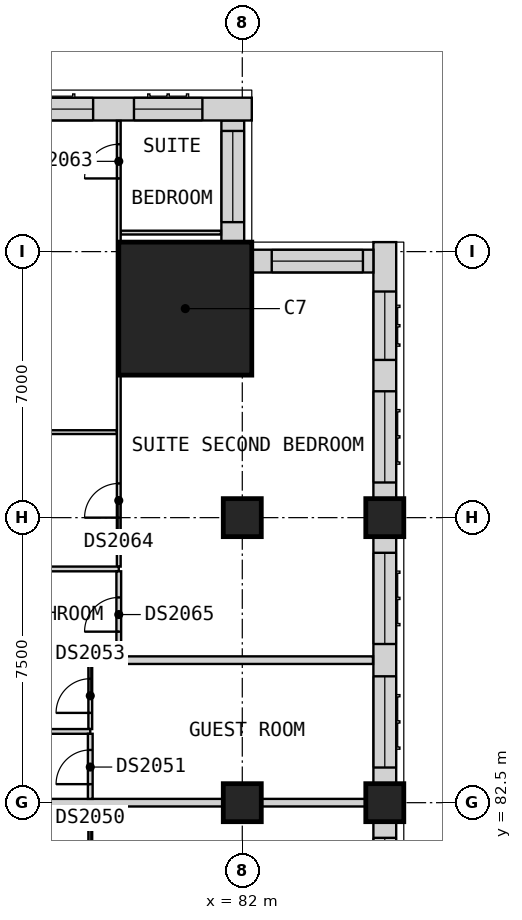
"""IFC4 building model, lengths in metres.
Left out: names, types, materials, properties, quantities, classifications, styles, units other than length and angle.
Written with IfcOpenShell. Run it as: python <this file> out.ifc"""

import sys

from ifc_helpers import new_model, si_unit, direction, frame, frame_2d, origin, origin_2d, place, context, subcontext, project, spatial, rectangle, extrude, element, fill, save


model = new_model("IFC4")
c1 = context("Model", 3, precision=1e-05, world=origin(), true_north=direction((0.0, 1.0)))
c2 = subcontext(c1, "Body", "Model", "MODEL_VIEW")
j1 = project(units=[si_unit("LENGTHUNIT", "METRE"), si_unit("PLANEANGLEUNIT", "RADIAN")], contexts=[c1])
p1 = place(None, origin())
s1 = spatial("IfcSite", under=j1, at=p1, CompositionType="ELEMENT")
p2 = place(p1, origin())
s2 = spatial("IfcBuilding", under=s1, at=p2, CompositionType="ELEMENT")
p3 = place(p2, frame((0.0, 0.0, 133.8)))
s3 = spatial("IfcBuildingStorey", under=s2, at=p3, CompositionType="ELEMENT", Elevation=133.8)
for number, where, z_axis, x_axis in (
    (1, (85.75, 82.5, 0.0), (0.0, 0.0, 1.0), (1.0, 0.0, 0.0)),
    (2, (85.75, 90.0, 0.0), (0.0, 0.0, 1.0), (1.0, 0.0, 0.0)),
    (3, (82.0, 82.5, 0.0), (0.0, 0.0, 1.0), (1.0, 0.0, 0.0)),
    (4, (82.0, 90.0, 0.0), (0.0, 0.0, 1.0), (1.0, 0.0, 0.0)),
):
    element("IfcColumn", number, at=place(p3, frame(where, z_axis=z_axis, x_axis=x_axis)), inside=s3, PredefinedType="COLUMN", context=c2, shape_type="SweptSolid", body=[
        extrude(rectangle(XDim=1.0, YDim=1.0, at=origin_2d()), origin(), (0.0, 0.0, 1.0), 3.6),
    ])
p4 = place(p3, frame((80.5, 95.5, 0.0), z_axis=(0.0, 0.0, 1.0), x_axis=(1.0, 0.0, 0.0)))
e5 = element("IfcColumn", 5, at=p4, inside=s3, PredefinedType="COLUMN", context=c2, shape_type="SweptSolid", body=[
    extrude(rectangle(XDim=3.5, YDim=3.5, at=origin_2d()), origin(), (0.0, 0.0, 1.0), 3.6),
])
p5 = place(p3, frame((85.75, 75.5, 0.0), z_axis=(0.0, 0.0, 1.0), x_axis=(0.0, 1.0, 0.0)))
e6 = element("IfcWall", 6, at=p5, inside=s3, PredefinedType="SOLIDWALL", context=c2, shape_type="SweptSolid", body=[
    extrude(rectangle(XDim=6.5, YDim=0.6, at=frame_2d((3.25, 0.0))), origin(), (0.0, 0.0, 1.0), 2.85),
])
p6 = place(p5, frame((0.425, 0.0, 0.8)))
e7 = element("IfcOpeningElement", 7, at=p6, cuts=e6, PredefinedType="OPENING", context=c2, shape_type="SweptSolid", body=[
    extrude(rectangle(XDim=2.4, YDim=1.8, at=frame_2d((1.2, 0.9))), frame((0.0, 0.31, 0.0), z_axis=(0.0, -1.0, 0.0), x_axis=(1.0, 0.0, 0.0)), (0.0, 0.0, 1.0), 0.62),
])
p7 = place(p5, frame((3.675, 0.0, 0.8)))
e8 = element("IfcOpeningElement", 8, at=p7, cuts=e6, PredefinedType="OPENING", context=c2, shape_type="SweptSolid", body=[
    extrude(rectangle(XDim=2.4, YDim=1.8, at=frame_2d((1.2, 0.9))), frame((0.0, 0.31, 0.0), z_axis=(0.0, -1.0, 0.0), x_axis=(1.0, 0.0, 0.0)), (0.0, 0.0, 1.0), 0.62),
])
p8 = place(p3, frame((85.75, 83.0, 0.0), z_axis=(0.0, 0.0, 1.0), x_axis=(0.0, 1.0, 0.0)))
e9 = element("IfcWall", 9, at=p8, inside=s3, PredefinedType="SOLIDWALL", context=c2, shape_type="SweptSolid", body=[
    extrude(rectangle(XDim=6.5, YDim=0.6, at=frame_2d((3.25, 0.0))), origin(), (0.0, 0.0, 1.0), 2.85),
])
p9 = place(p8, frame((0.425, 0.0, 0.8)))
e10 = element("IfcOpeningElement", 10, at=p9, cuts=e9, PredefinedType="OPENING", context=c2, shape_type="SweptSolid", body=[
    extrude(rectangle(XDim=2.4, YDim=1.8, at=frame_2d((1.2, 0.9))), frame((0.0, 0.31, 0.0), z_axis=(0.0, -1.0, 0.0), x_axis=(1.0, 0.0, 0.0)), (0.0, 0.0, 1.0), 0.62),
])
p10 = place(p8, frame((3.675, 0.0, 0.8)))
e11 = element("IfcOpeningElement", 11, at=p10, cuts=e9, PredefinedType="OPENING", context=c2, shape_type="SweptSolid", body=[
    extrude(rectangle(XDim=2.4, YDim=1.8, at=frame_2d((1.2, 0.9))), frame((0.0, 0.31, 0.0), z_axis=(0.0, -1.0, 0.0), x_axis=(1.0, 0.0, 0.0)), (0.0, 0.0, 1.0), 0.62),
])
p11 = place(p3, frame((85.75, 90.5, 0.0), z_axis=(0.0, 0.0, 1.0), x_axis=(0.0, 1.0, 0.0)))
e12 = element("IfcWall", 12, at=p11, inside=s3, PredefinedType="SOLIDWALL", context=c2, shape_type="SweptSolid", body=[
    extrude(rectangle(XDim=6.75, YDim=0.6, at=frame_2d((3.375, 0.0))), origin(), (0.0, 0.0, 1.0), 2.85),
])
p12 = place(p11, frame((0.425, 0.0, 0.8)))
e13 = element("IfcOpeningElement", 13, at=p12, cuts=e12, PredefinedType="OPENING", context=c2, shape_type="SweptSolid", body=[
    extrude(rectangle(XDim=2.4, YDim=1.8, at=frame_2d((1.2, 0.9))), frame((0.0, 0.31, 0.0), z_axis=(0.0, -1.0, 0.0), x_axis=(1.0, 0.0, 0.0)), (0.0, 0.0, 1.0), 0.62),
])
p13 = place(p11, frame((3.65, 0.0, 0.8)))
e14 = element("IfcOpeningElement", 14, at=p13, cuts=e12, PredefinedType="OPENING", context=c2, shape_type="SweptSolid", body=[
    extrude(rectangle(XDim=1.8, YDim=1.8, at=frame_2d((0.9, 0.9))), frame((0.0, 0.31, 0.0), z_axis=(0.0, -1.0, 0.0), x_axis=(1.0, 0.0, 0.0)), (0.0, 0.0, 1.0), 0.62),
])
p14 = place(p3, frame((85.45, 96.75, 0.0), z_axis=(0.0, 0.0, 1.0), x_axis=(-1.0, 0.0, 0.0)))
e15 = element("IfcWall", 15, at=p14, inside=s3, PredefinedType="SOLIDWALL", context=c2, shape_type="SweptSolid", body=[
    extrude(rectangle(XDim=3.2, YDim=0.6, at=frame_2d((1.6, 0.0))), origin(), (0.0, 0.0, 1.0), 3.35),
])
p15 = place(p14, frame((0.275, 0.0, 0.8)))
e16 = element("IfcOpeningElement", 16, at=p15, cuts=e15, PredefinedType="OPENING", context=c2, shape_type="SweptSolid", body=[
    extrude(rectangle(XDim=2.4, YDim=1.8, at=frame_2d((1.2, 0.9))), frame((0.0, 0.31, 0.0), z_axis=(0.0, -1.0, 0.0), x_axis=(1.0, 0.0, 0.0)), (0.0, 0.0, 1.0), 0.62),
])
p16 = place(p3, frame((81.75, 97.25, 0.0), z_axis=(0.0, 0.0, 1.0), x_axis=(0.0, 1.0, 0.0)))
e17 = element("IfcWall", 17, at=p16, inside=s3, PredefinedType="SOLIDWALL", context=c2, shape_type="SweptSolid", body=[
    extrude(rectangle(XDim=3.2, YDim=0.6, at=frame_2d((1.6, 0.0))), origin(), (0.0, 0.0, 1.0), 3.35),
])
p17 = place(p16, frame((0.525, 0.0, 0.8)))
e18 = element("IfcOpeningElement", 18, at=p17, cuts=e17, PredefinedType="OPENING", context=c2, shape_type="SweptSolid", body=[
    extrude(rectangle(XDim=2.4, YDim=1.8, at=frame_2d((1.2, 0.9))), frame((0.0, 0.31, 0.0), z_axis=(0.0, -1.0, 0.0), x_axis=(1.0, 0.0, 0.0)), (0.0, 0.0, 1.0), 0.62),
])
p18 = place(p3, frame((82.25, 100.75, 0.0), z_axis=(0.0, 0.0, 1.0), x_axis=(-1.0, 0.0, 0.0)))
e19 = element("IfcWall", 19, at=p18, inside=s3, PredefinedType="SOLIDWALL", context=c2, shape_type="SweptSolid", body=[
    extrude(rectangle(XDim=7.25, YDim=0.6, at=frame_2d((3.625, 0.0))), origin(), (0.0, 0.0, 1.0), 2.85),
])
p19 = place(p18, frame((4.175, 0.0, 0.8)))
e20 = element("IfcOpeningElement", 20, at=p19, cuts=e19, PredefinedType="OPENING", context=c2, shape_type="SweptSolid", body=[
    extrude(rectangle(XDim=2.4, YDim=1.8, at=frame_2d((1.2, 0.9))), frame((0.0, 0.31, 0.0), z_axis=(0.0, -1.0, 0.0), x_axis=(1.0, 0.0, 0.0)), (0.0, 0.0, 1.0), 0.62),
])
p20 = place(p18, frame((1.3, 0.0, 0.8)))
e21 = element("IfcOpeningElement", 21, at=p20, cuts=e19, PredefinedType="OPENING", context=c2, shape_type="SweptSolid", body=[
    extrude(rectangle(XDim=1.8, YDim=1.8, at=frame_2d((0.9, 0.9))), frame((0.0, 0.31, 0.0), z_axis=(0.0, -1.0, 0.0), x_axis=(1.0, 0.0, 0.0)), (0.0, 0.0, 1.0), 0.62),
])
p21 = place(p3, frame((73.725, 82.5, 0.0), z_axis=(0.0, 0.0, 1.0), x_axis=(1.0, 0.0, 0.0)))
e22 = element("IfcWall", 22, at=p21, inside=s3, PredefinedType="PARTITIONING", context=c2, shape_type="SweptSolid", body=[
    extrude(rectangle(XDim=12.525, YDim=0.2, at=frame_2d((6.262, 0.0))), origin(), (0.0, 0.0, 1.0), 3.35),
])
p22 = place(p3, frame((73.725, 86.25, 0.0), z_axis=(0.0, 0.0, 1.0), x_axis=(1.0, 0.0, 0.0)))
e23 = element("IfcWall", 23, at=p22, inside=s3, PredefinedType="PARTITIONING", context=c2, shape_type="SweptSolid", body=[
    extrude(rectangle(XDim=11.715, YDim=0.2, at=frame_2d((5.857, 0.0))), origin(), (0.0, 0.0, 1.0), 3.35),
])
p23 = place(p3, frame((71.35, 92.25, 0.0), z_axis=(0.0, 0.0, 1.0), x_axis=(1.0, 0.0, 0.0)))
e24 = element("IfcWall", 24, at=p23, inside=s3, PredefinedType="PARTITIONING", context=c2, shape_type="SweptSolid", body=[
    extrude(rectangle(XDim=7.35, YDim=0.1, at=frame_2d((3.675, 0.0))), origin(), (0.0, 0.0, 1.0), 3.35),
])
p24 = place(p23, frame((0.65, 0.0, 0.0)))
e25 = element("IfcOpeningElement", 25, at=p24, cuts=e24, PredefinedType="OPENING", context=c2, shape_type="SweptSolid", body=[
    extrude(rectangle(XDim=0.9, YDim=2.1, at=frame_2d((0.45, 1.05))), frame((0.0, 0.06, 0.0), z_axis=(0.0, -1.0, 0.0), x_axis=(1.0, 0.0, 0.0)), (0.0, 0.0, 1.0), 0.12),
])
p25 = place(p3, frame((78.8, 97.5, 0.0), z_axis=(0.0, 0.0, 1.0), x_axis=(1.0, 0.0, 0.0)))
e26 = element("IfcWall", 26, at=p25, inside=s3, PredefinedType="PARTITIONING", context=c2, shape_type="SweptSolid", body=[
    extrude(rectangle(XDim=2.64, YDim=0.1, at=frame_2d((1.32, 0.0))), origin(), (0.0, 0.0, 1.0), 3.35),
])
p26 = place(p3, frame((78.0, 79.562, 0.0), z_axis=(0.0, 0.0, 1.0), x_axis=(0.0, 1.0, 0.0)))
e27 = element("IfcWall", 27, at=p26, inside=s3, PredefinedType="PARTITIONING", context=c2, shape_type="SweptSolid", body=[
    extrude(rectangle(XDim=2.837, YDim=0.1, at=frame_2d((1.419, 0.0))), origin(), (0.0, 0.0, 1.0), 3.35),
])
p27 = place(p26, frame((0.988, 0.0, 0.0)))
e28 = element("IfcOpeningElement", 28, at=p27, cuts=e27, PredefinedType="OPENING", context=c2, shape_type="SweptSolid", body=[
    extrude(rectangle(XDim=0.9, YDim=2.1, at=frame_2d((0.45, 1.05))), frame((0.0, 0.06, 0.0), z_axis=(0.0, -1.0, 0.0), x_axis=(1.0, 0.0, 0.0)), (0.0, 0.0, 1.0), 0.12),
])
p28 = place(p3, frame((78.0, 84.438, 0.0), z_axis=(0.0, 0.0, 1.0), x_axis=(0.0, 1.0, 0.0)))
e29 = element("IfcWall", 29, at=p28, inside=s3, PredefinedType="PARTITIONING", context=c2, shape_type="SweptSolid", body=[
    extrude(rectangle(XDim=1.712, YDim=0.1, at=frame_2d((0.856, 0.0))), origin(), (0.0, 0.0, 1.0), 3.35),
])
p29 = place(p28, frame((0.425, 0.0, 0.0)))
e30 = element("IfcOpeningElement", 30, at=p29, cuts=e29, PredefinedType="OPENING", context=c2, shape_type="SweptSolid", body=[
    extrude(rectangle(XDim=0.9, YDim=2.1, at=frame_2d((0.45, 1.05))), frame((0.0, 0.06, 0.0), z_axis=(0.0, -1.0, 0.0), x_axis=(1.0, 0.0, 0.0)), (0.0, 0.0, 1.0), 0.12),
])
p30 = place(p3, frame((78.75, 88.712, 0.0), z_axis=(0.0, 0.0, 1.0), x_axis=(0.0, 1.0, 0.0)))
e31 = element("IfcWall", 31, at=p30, inside=s3, PredefinedType="PARTITIONING", context=c2, shape_type="SweptSolid", body=[
    extrude(rectangle(XDim=11.728, YDim=0.1, at=frame_2d((5.864, 0.0))), origin(), (0.0, 0.0, 1.0), 3.35),
])
p31 = place(p30, frame((10.212, 0.0, 0.0)))
e32 = element("IfcOpeningElement", 32, at=p31, cuts=e31, PredefinedType="OPENING", context=c2, shape_type="SweptSolid", body=[
    extrude(rectangle(XDim=0.9, YDim=2.1, at=frame_2d((0.45, 1.05))), frame((0.0, 0.06, 0.0), z_axis=(0.0, -1.0, 0.0), x_axis=(1.0, 0.0, 0.0)), (0.0, 0.0, 1.0), 0.12),
])
p32 = place(p30, frame((1.288, 0.0, 0.0)))
e33 = element("IfcOpeningElement", 33, at=p32, cuts=e31, PredefinedType="OPENING", context=c2, shape_type="SweptSolid", body=[
    extrude(rectangle(XDim=0.9, YDim=2.1, at=frame_2d((0.45, 1.05))), frame((0.0, 0.06, 0.0), z_axis=(0.0, -1.0, 0.0), x_axis=(1.0, 0.0, 0.0)), (0.0, 0.0, 1.0), 0.12),
])
p33 = place(p3, frame((73.725, 84.375, 0.0), z_axis=(0.0, 0.0, 1.0), x_axis=(1.0, 0.0, 0.0)))
e34 = element("IfcWall", 34, at=p33, inside=s3, PredefinedType="PARTITIONING", context=c2, shape_type="SweptSolid", body=[
    extrude(rectangle(XDim=4.275, YDim=0.125, at=frame_2d((2.137, 0.0))), origin(), (0.0, 0.0, 1.0), 3.35),
])
p34 = place(p3, frame((73.725, 88.65, 0.0), z_axis=(0.0, 0.0, 1.0), x_axis=(1.0, 0.0, 0.0)))
e35 = element("IfcWall", 35, at=p34, inside=s3, PredefinedType="PARTITIONING", context=c2, shape_type="SweptSolid", body=[
    extrude(rectangle(XDim=5.025, YDim=0.125, at=frame_2d((2.512, 0.0))), origin(), (0.0, 0.0, 1.0), 3.35),
])
p35 = place(p3, frame((78.0, 82.6, 0.0), z_axis=(0.0, 0.0, 1.0), x_axis=(0.0, 1.0, 0.0)))
e36 = element("IfcWall", 36, at=p35, inside=s3, PredefinedType="PARTITIONING", context=c2, shape_type="SweptSolid", body=[
    extrude(rectangle(XDim=1.712, YDim=0.125, at=frame_2d((0.856, 0.0))), origin(), (0.0, 0.0, 1.0), 3.35),
])
p36 = place(p35, frame((0.387, 0.0, 0.0)))
e37 = element("IfcOpeningElement", 37, at=p36, cuts=e36, PredefinedType="OPENING", context=c2, shape_type="SweptSolid", body=[
    extrude(rectangle(XDim=0.9, YDim=2.1, at=frame_2d((0.45, 1.05))), frame((0.0, 0.073, 0.0), z_axis=(0.0, -1.0, 0.0), x_axis=(1.0, 0.0, 0.0)), (0.0, 0.0, 1.0), 0.145),
])
p37 = place(p3, frame((78.75, 86.35, 0.0), z_axis=(0.0, 0.0, 1.0), x_axis=(0.0, 1.0, 0.0)))
e38 = element("IfcWall", 38, at=p37, inside=s3, PredefinedType="PARTITIONING", context=c2, shape_type="SweptSolid", body=[
    extrude(rectangle(XDim=2.237, YDim=0.125, at=frame_2d((1.119, 0.0))), origin(), (0.0, 0.0, 1.0), 3.35),
])
p38 = place(p37, frame((0.65, 0.0, 0.0)))
e39 = element("IfcOpeningElement", 39, at=p38, cuts=e38, PredefinedType="OPENING", context=c2, shape_type="SweptSolid", body=[
    extrude(rectangle(XDim=0.9, YDim=2.1, at=frame_2d((0.45, 1.05))), frame((0.0, 0.073, 0.0), z_axis=(0.0, -1.0, 0.0), x_axis=(1.0, 0.0, 0.0)), (0.0, 0.0, 1.0), 0.145),
])
p39 = place(p7, origin())
e40 = element("IfcWindow", 40, at=p39, inside=s3, PartitioningType="SINGLE_PANEL", PredefinedType="WINDOW", context=c2, shape_type="SweptSolid", body=[
    extrude(rectangle(XDim=2.4, YDim=1.8, at=frame_2d((1.2, 0.9))), frame((0.0, -0.07, 0.0), z_axis=(0.0, -1.0, 0.0), x_axis=(1.0, 0.0, 0.0)), (0.0, 0.0, 1.0), 0.06),
])
fill(e8, e40)
p40 = place(p9, origin())
e41 = element("IfcWindow", 41, at=p40, inside=s3, PartitioningType="SINGLE_PANEL", PredefinedType="WINDOW", context=c2, shape_type="SweptSolid", body=[
    extrude(rectangle(XDim=2.4, YDim=1.8, at=frame_2d((1.2, 0.9))), frame((0.0, -0.07, 0.0), z_axis=(0.0, -1.0, 0.0), x_axis=(1.0, 0.0, 0.0)), (0.0, 0.0, 1.0), 0.06),
])
fill(e10, e41)
p41 = place(p10, origin())
e42 = element("IfcWindow", 42, at=p41, inside=s3, PartitioningType="SINGLE_PANEL", PredefinedType="WINDOW", context=c2, shape_type="SweptSolid", body=[
    extrude(rectangle(XDim=2.4, YDim=1.8, at=frame_2d((1.2, 0.9))), frame((0.0, -0.07, 0.0), z_axis=(0.0, -1.0, 0.0), x_axis=(1.0, 0.0, 0.0)), (0.0, 0.0, 1.0), 0.06),
])
fill(e11, e42)
p42 = place(p12, origin())
e43 = element("IfcWindow", 43, at=p42, inside=s3, PartitioningType="SINGLE_PANEL", PredefinedType="WINDOW", context=c2, shape_type="SweptSolid", body=[
    extrude(rectangle(XDim=2.4, YDim=1.8, at=frame_2d((1.2, 0.9))), frame((0.0, -0.07, 0.0), z_axis=(0.0, -1.0, 0.0), x_axis=(1.0, 0.0, 0.0)), (0.0, 0.0, 1.0), 0.06),
])
fill(e13, e43)
p43 = place(p13, origin())
e44 = element("IfcWindow", 44, at=p43, inside=s3, PartitioningType="SINGLE_PANEL", PredefinedType="WINDOW", context=c2, shape_type="SweptSolid", body=[
    extrude(rectangle(XDim=1.8, YDim=1.8, at=frame_2d((0.9, 0.9))), frame((0.0, -0.07, 0.0), z_axis=(0.0, -1.0, 0.0), x_axis=(1.0, 0.0, 0.0)), (0.0, 0.0, 1.0), 0.06),
])
fill(e14, e44)
p44 = place(p15, origin())
e45 = element("IfcWindow", 45, at=p44, inside=s3, PartitioningType="SINGLE_PANEL", PredefinedType="WINDOW", context=c2, shape_type="SweptSolid", body=[
    extrude(rectangle(XDim=2.4, YDim=1.8, at=frame_2d((1.2, 0.9))), frame((0.0, -0.07, 0.0), z_axis=(0.0, -1.0, 0.0), x_axis=(1.0, 0.0, 0.0)), (0.0, 0.0, 1.0), 0.06),
])
fill(e16, e45)
p45 = place(p17, origin())
e46 = element("IfcWindow", 46, at=p45, inside=s3, PartitioningType="SINGLE_PANEL", PredefinedType="WINDOW", context=c2, shape_type="SweptSolid", body=[
    extrude(rectangle(XDim=2.4, YDim=1.8, at=frame_2d((1.2, 0.9))), frame((0.0, -0.07, 0.0), z_axis=(0.0, -1.0, 0.0), x_axis=(1.0, 0.0, 0.0)), (0.0, 0.0, 1.0), 0.06),
])
fill(e18, e46)
p46 = place(p19, origin())
e47 = element("IfcWindow", 47, at=p46, inside=s3, PartitioningType="SINGLE_PANEL", PredefinedType="WINDOW", context=c2, shape_type="SweptSolid", body=[
    extrude(rectangle(XDim=2.4, YDim=1.8, at=frame_2d((1.2, 0.9))), frame((0.0, -0.07, 0.0), z_axis=(0.0, -1.0, 0.0), x_axis=(1.0, 0.0, 0.0)), (0.0, 0.0, 1.0), 0.06),
])
fill(e20, e47)
p47 = place(p20, origin())
e48 = element("IfcWindow", 48, at=p47, inside=s3, PartitioningType="SINGLE_PANEL", PredefinedType="WINDOW", context=c2, shape_type="SweptSolid", body=[
    extrude(rectangle(XDim=1.8, YDim=1.8, at=frame_2d((0.9, 0.9))), frame((0.0, -0.07, 0.0), z_axis=(0.0, -1.0, 0.0), x_axis=(1.0, 0.0, 0.0)), (0.0, 0.0, 1.0), 0.06),
])
fill(e21, e48)
p48 = place(p36, origin())
e49 = element("IfcDoor", 49, at=p48, inside=s3, OperationType="SINGLE_SWING_LEFT", PredefinedType="DOOR", context=c2, shape_type="SweptSolid", body=[
    extrude(rectangle(XDim=0.9, YDim=2.1, at=frame_2d((0.45, 1.05))), frame((0.0, 0.025, 0.0), z_axis=(0.0, -1.0, 0.0), x_axis=(1.0, 0.0, 0.0)), (0.0, 0.0, 1.0), 0.05),
])
fill(e37, e49)
p49 = place(p29, origin())
e50 = element("IfcDoor", 50, at=p49, inside=s3, OperationType="SINGLE_SWING_LEFT", PredefinedType="DOOR", context=c2, shape_type="SweptSolid", body=[
    extrude(rectangle(XDim=0.9, YDim=2.1, at=frame_2d((0.45, 1.05))), frame((0.0, 0.025, 0.0), z_axis=(0.0, -1.0, 0.0), x_axis=(1.0, 0.0, 0.0)), (0.0, 0.0, 1.0), 0.05),
])
fill(e30, e50)
p50 = place(p31, origin())
e51 = element("IfcDoor", 51, at=p50, inside=s3, OperationType="SINGLE_SWING_LEFT", PredefinedType="DOOR", context=c2, shape_type="SweptSolid", body=[
    extrude(rectangle(XDim=0.9, YDim=2.1, at=frame_2d((0.45, 1.05))), frame((0.0, 0.025, 0.0), z_axis=(0.0, -1.0, 0.0), x_axis=(1.0, 0.0, 0.0)), (0.0, 0.0, 1.0), 0.05),
])
fill(e32, e51)
p51 = place(p32, origin())
e52 = element("IfcDoor", 52, at=p51, inside=s3, OperationType="SINGLE_SWING_RIGHT", PredefinedType="DOOR", context=c2, shape_type="SweptSolid", body=[
    extrude(rectangle(XDim=0.9, YDim=2.1, at=frame_2d((0.45, 1.05))), frame((0.0, 0.025, 0.0), z_axis=(0.0, -1.0, 0.0), x_axis=(1.0, 0.0, 0.0)), (0.0, 0.0, 1.0), 0.05),
])
fill(e33, e52)
p52 = place(p38, origin())
e53 = element("IfcDoor", 53, at=p52, inside=s3, OperationType="SINGLE_SWING_LEFT", PredefinedType="DOOR", context=c2, shape_type="SweptSolid", body=[
    extrude(rectangle(XDim=0.9, YDim=2.1, at=frame_2d((0.45, 1.05))), frame((0.0, 0.025, 0.0), z_axis=(0.0, -1.0, 0.0), x_axis=(1.0, 0.0, 0.0)), (0.0, 0.0, 1.0), 0.05),
])
fill(e39, e53)
save(model, sys.argv[1])
